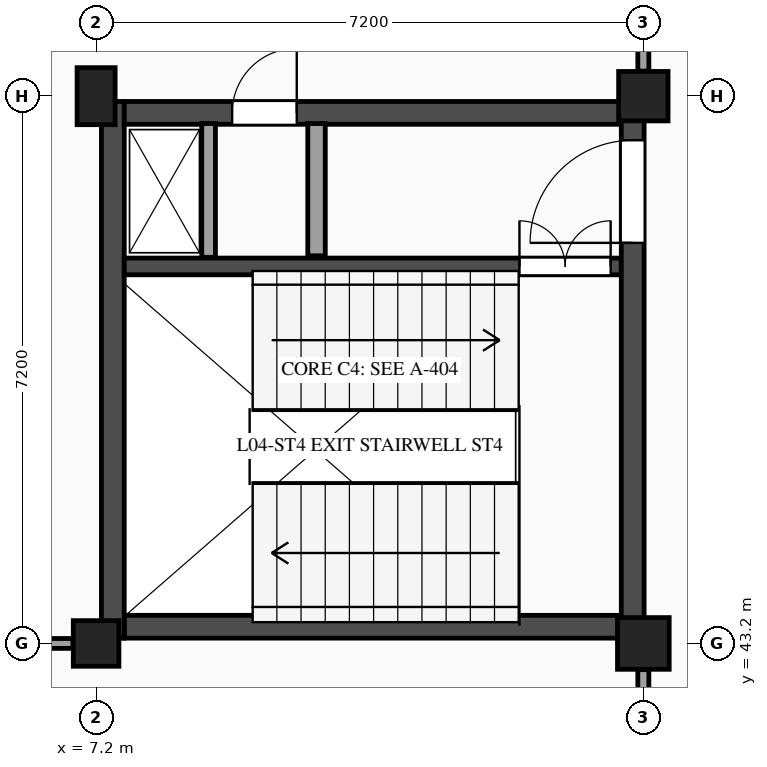
"""IFC4 building model, lengths in metres.
Left out: names, types, materials, properties, quantities, classifications, styles, units other than length and angle.
Written with IfcOpenShell. Run it as: python <this file> out.ifc"""

import sys

from ifc_helpers import new_model, si_unit, direction, frame, frame_2d, origin, origin_2d, place, context, subcontext, project, spatial, rectangle, extrude, element, fill, save


model = new_model("IFC4")
c1 = context("Model", 3, precision=1e-05, world=origin(), true_north=direction((0.0, 1.0)))
c2 = subcontext(c1, "Body", "Model", "MODEL_VIEW")
j1 = project(units=[si_unit("LENGTHUNIT", "METRE"), si_unit("PLANEANGLEUNIT", "RADIAN")], contexts=[c1])
p1 = place(None, origin())
s1 = spatial("IfcSite", under=j1, at=p1, CompositionType="ELEMENT")
p2 = place(p1, origin())
s2 = spatial("IfcBuilding", under=s1, at=p2, CompositionType="ELEMENT")
p3 = place(p2, frame((0.0, 0.0, 18.6)))
s3 = spatial("IfcBuildingStorey", under=s2, at=p3, CompositionType="ELEMENT", Elevation=18.6)
p4 = place(p3, frame((7.2, 43.2, 0.0), z_axis=(0.0, 0.0, 1.0), x_axis=(1.0, 0.0, 0.0)))
e1 = element("IfcColumn", 1, at=p4, inside=s3, PredefinedType="COLUMN", context=c2, shape_type="SweptSolid", body=[
    extrude(rectangle(XDim=0.6, YDim=0.6, at=origin_2d()), origin(), (0.0, 0.0, 1.0), 4.2),
])
p5 = place(p3, frame((7.2, 50.4, 0.0), z_axis=(0.0, 0.0, 1.0), x_axis=(1.0, 0.0, 0.0)))
e2 = element("IfcColumn", 2, at=p5, inside=s3, PredefinedType="COLUMN", context=c2, shape_type="SweptSolid", body=[
    extrude(rectangle(XDim=0.5, YDim=0.75, at=origin_2d()), origin(), (0.0, 0.0, 1.0), 4.2),
])
p6 = place(p3, frame((14.4, 43.2, 0.0), z_axis=(0.0, 0.0, 1.0), x_axis=(1.0, 0.0, 0.0)))
e3 = element("IfcColumn", 3, at=p6, inside=s3, PredefinedType="COLUMN", context=c2, shape_type="SweptSolid", body=[
    extrude(rectangle(XDim=0.68, YDim=0.68, at=origin_2d()), origin(), (0.0, 0.0, 1.0), 4.2),
])
p7 = place(p3, frame((14.4, 50.4, 0.0), z_axis=(0.0, 0.0, 1.0), x_axis=(1.0, 0.0, 0.0)))
e4 = element("IfcColumn", 4, at=p7, inside=s3, PredefinedType="COLUMN", context=c2, shape_type="SweptSolid", body=[
    extrude(rectangle(XDim=0.65, YDim=0.65, at=origin_2d()), origin(), (0.0, 0.0, 1.0), 4.2),
])
p8 = place(p3, frame((7.57, 43.42, 0.0), z_axis=(0.0, 0.0, 1.0), x_axis=(1.0, 0.0, 0.0)))
e5 = element("IfcWall", 5, at=p8, inside=s3, PredefinedType="SHEAR", context=c2, shape_type="SweptSolid", body=[
    extrude(rectangle(XDim=6.54, YDim=0.3, at=frame_2d((3.27, 0.0))), origin(), (0.0, 0.0, 1.0), 3.955),
])
p9 = place(p3, frame((7.42, 50.33, 0.0), z_axis=(0.0, 0.0, 1.0), x_axis=(0.0, -1.0, 0.0)))
e6 = element("IfcWall", 6, at=p9, inside=s3, PredefinedType="SHEAR", context=c2, shape_type="SweptSolid", body=[
    extrude(rectangle(XDim=7.06, YDim=0.3, at=frame_2d((3.53, 0.0))), origin(), (0.0, 0.0, 1.0), 3.955),
])
p10 = place(p3, frame((7.57, 50.18, 0.0), z_axis=(0.0, 0.0, 1.0), x_axis=(1.0, 0.0, 0.0)))
e7 = element("IfcWall", 7, at=p10, inside=s3, PredefinedType="SHEAR", context=c2, shape_type="SweptSolid", body=[
    extrude(rectangle(XDim=6.54, YDim=0.3, at=frame_2d((3.27, 0.0))), origin(), (0.0, 0.0, 1.0), 3.955),
])
p11 = place(p10, frame((1.42, 0.0, 0.0)))
e8 = element("IfcOpeningElement", 8, at=p11, cuts=e7, PredefinedType="OPENING", context=c2, shape_type="SweptSolid", body=[
    extrude(rectangle(XDim=0.85, YDim=2.1, at=frame_2d((0.425, 1.05))), frame((0.0, 0.16, 0.0), z_axis=(0.0, -1.0, 0.0), x_axis=(1.0, 0.0, 0.0)), (0.0, 0.0, 1.0), 0.32),
])
p12 = place(p3, frame((7.57, 48.16, 0.0), z_axis=(0.0, 0.0, 1.0), x_axis=(1.0, 0.0, 0.0)))
e9 = element("IfcWall", 9, at=p12, inside=s3, PredefinedType="SHEAR", context=c2, shape_type="SweptSolid", body=[
    extrude(rectangle(XDim=6.54, YDim=0.22, at=frame_2d((3.27, 0.0))), origin(), (0.0, 0.0, 1.0), 3.955),
])
p13 = place(p12, frame((5.2, 0.0, 0.0)))
e10 = element("IfcOpeningElement", 10, at=p13, cuts=e9, PredefinedType="OPENING", context=c2, shape_type="SweptSolid", body=[
    extrude(rectangle(XDim=1.2, YDim=2.2, at=frame_2d((0.6, 1.1))), frame((0.0, 0.12, 0.0), z_axis=(0.0, -1.0, 0.0), x_axis=(1.0, 0.0, 0.0)), (0.0, 0.0, 1.0), 0.24),
])
p14 = place(p3, frame((10.1, 48.3, 0.0), z_axis=(0.0, 0.0, 1.0), x_axis=(0.0, 1.0, 0.0)))
e11 = element("IfcWall", 11, at=p14, inside=s3, PredefinedType="PARTITIONING", context=c2, shape_type="SweptSolid", body=[
    extrude(rectangle(XDim=1.74, YDim=0.23, at=frame_2d((0.87, 0.0))), origin(), (0.0, 0.0, 1.0), 3.955),
])
p15 = place(p3, frame((8.68, 48.28, 0.0), z_axis=(0.0, 0.0, 1.0), x_axis=(0.0, 1.0, 0.0)))
e12 = element("IfcWall", 12, at=p15, inside=s3, PredefinedType="PARTITIONING", context=c2, shape_type="SweptSolid", body=[
    extrude(rectangle(XDim=1.76, YDim=0.18, at=frame_2d((0.88, 0.0))), origin(), (0.0, 0.0, 1.0), 3.955),
])
p16 = place(p3, frame((14.26, 43.27, 0.0), z_axis=(0.0, 0.0, 1.0), x_axis=(0.0, 1.0, 0.0)))
e13 = element("IfcWall", 13, at=p16, inside=s3, PredefinedType="SHEAR", context=c2, shape_type="SweptSolid", body=[
    extrude(rectangle(XDim=7.06, YDim=0.3, at=frame_2d((3.53, 0.0))), origin(), (0.0, 0.0, 1.0), 3.955),
])
p17 = place(p16, frame((5.2, 0.0, 0.0)))
e14 = element("IfcOpeningElement", 14, at=p17, cuts=e13, PredefinedType="OPENING", context=c2, shape_type="SweptSolid", body=[
    extrude(rectangle(XDim=1.35, YDim=2.15, at=frame_2d((0.675, 1.075))), frame((0.0, 0.16, 0.0), z_axis=(0.0, -1.0, 0.0), x_axis=(1.0, 0.0, 0.0)), (0.0, 0.0, 1.0), 0.32),
])
p18 = place(p3, frame((0.345, 43.2, 0.0), z_axis=(0.0, 0.0, 1.0), x_axis=(1.0, 0.0, 0.0)))
e15 = element("IfcWall", 15, at=p18, inside=s3, PredefinedType="PARTITIONING", context=c2, shape_type="SweptSolid", body=[
    extrude(rectangle(XDim=6.55, YDim=0.13, at=frame_2d((3.275, 0.0))), origin(), (0.0, 0.0, 1.0), 3.235),
])
p19 = place(p18, frame((2.725, 0.0, 0.0)))
e16 = element("IfcOpeningElement", 16, at=p19, cuts=e15, PredefinedType="OPENING", context=c2, shape_type="SweptSolid", body=[
    extrude(rectangle(XDim=1.1, YDim=2.15, at=frame_2d((0.55, 1.075))), frame((0.0, 0.075, 0.0), z_axis=(0.0, -1.0, 0.0), x_axis=(1.0, 0.0, 0.0)), (0.0, 0.0, 1.0), 0.15),
])
p20 = place(p3, frame((14.4, 36.325, 0.0), z_axis=(0.0, 0.0, 1.0), x_axis=(0.0, 1.0, 0.0)))
e17 = element("IfcWall", 17, at=p20, inside=s3, PredefinedType="PARTITIONING", context=c2, shape_type="SweptSolid", body=[
    extrude(rectangle(XDim=6.53, YDim=0.145, at=frame_2d((3.265, 0.0))), origin(), (0.0, 0.0, 1.0), 3.27),
])
p21 = place(p3, frame((14.4, 50.73, 0.0), z_axis=(0.0, 0.0, 1.0), x_axis=(0.0, 1.0, 0.0)))
e18 = element("IfcWall", 18, at=p21, inside=s3, PredefinedType="PARTITIONING", context=c2, shape_type="SweptSolid", body=[
    extrude(rectangle(XDim=6.555, YDim=0.145, at=frame_2d((3.277, 0.0))), origin(), (0.0, 0.0, 1.0), 3.24),
])
p22 = place(p21, frame((2.317, 0.0, 0.0)))
e19 = element("IfcOpeningElement", 19, at=p22, cuts=e18, PredefinedType="OPENING", context=c2, shape_type="SweptSolid", body=[
    extrude(rectangle(XDim=1.92, YDim=2.35, at=frame_2d((0.96, 1.175))), frame((0.0, 0.083, 0.0), z_axis=(0.0, -1.0, 0.0), x_axis=(1.0, 0.0, 0.0)), (0.0, 0.0, 1.0), 0.165),
])
p23 = place(p11, origin())
e20 = element("IfcDoor", 20, at=p23, inside=s3, OperationType="SINGLE_SWING_RIGHT", PredefinedType="DOOR", context=c2, shape_type="SweptSolid", body=[
    extrude(rectangle(XDim=0.85, YDim=2.1, at=frame_2d((0.425, 1.05))), frame((0.0, 0.025, 0.0), z_axis=(0.0, -1.0, 0.0), x_axis=(1.0, 0.0, 0.0)), (0.0, 0.0, 1.0), 0.05),
])
fill(e8, e20)
p24 = place(p13, origin())
e21 = element("IfcDoor", 21, at=p24, inside=s3, OperationType="DOUBLE_DOOR_SINGLE_SWING", PredefinedType="DOOR", context=c2, shape_type="SweptSolid", body=[
    extrude(rectangle(XDim=1.2, YDim=2.2, at=frame_2d((0.6, 1.1))), frame((0.0, 0.025, 0.0), z_axis=(0.0, -1.0, 0.0), x_axis=(1.0, 0.0, 0.0)), (0.0, 0.0, 1.0), 0.05),
])
fill(e10, e21)
p25 = place(p17, origin())
e22 = element("IfcDoor", 22, at=p25, inside=s3, OperationType="SINGLE_SWING_LEFT", PredefinedType="DOOR", context=c2, shape_type="SweptSolid", body=[
    extrude(rectangle(XDim=1.35, YDim=2.15, at=frame_2d((0.675, 1.075))), frame((0.0, 0.025, 0.0), z_axis=(0.0, -1.0, 0.0), x_axis=(1.0, 0.0, 0.0)), (0.0, 0.0, 1.0), 0.05),
])
fill(e14, e22)
save(model, sys.argv[1])
